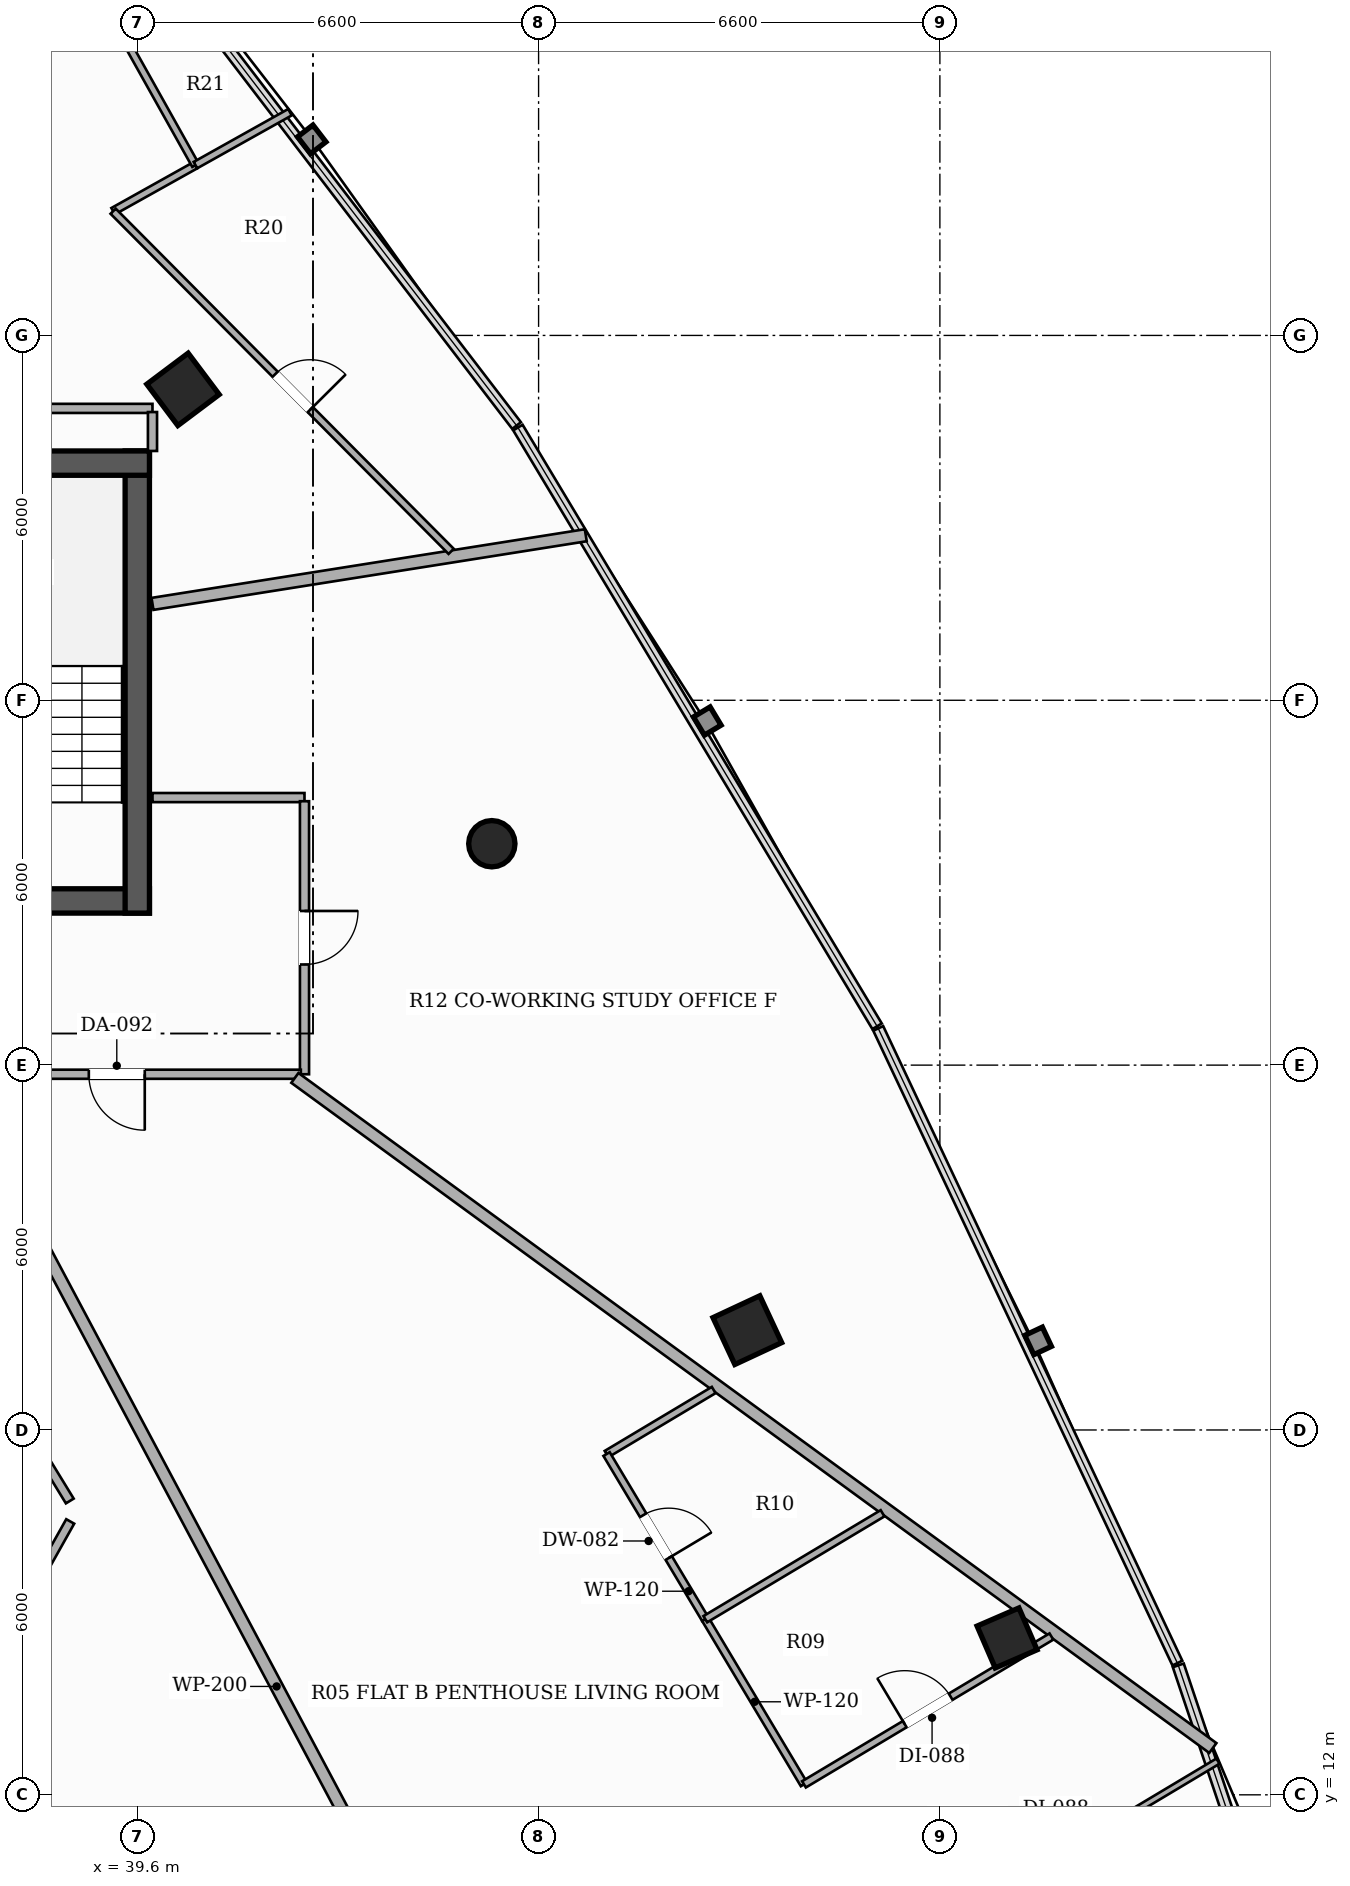
"""IFC4 building model, lengths in metres.
Left out: names, types, materials, properties, quantities, classifications, styles, units other than length and angle.
Written with IfcOpenShell. Run it as: python <this file> out.ifc"""

import sys

from ifc_helpers import new_model, si_unit, direction, frame, frame_2d, origin, origin_2d, place, context, subcontext, project, spatial, rectangle, hollow_rectangle, hollow_circle, extrude, element, fill, save


model = new_model("IFC4")
c1 = context("Model", 3, precision=1e-05, world=origin(), true_north=direction((0.0, 1.0)))
c2 = subcontext(c1, "Body", "Model", "MODEL_VIEW")
j1 = project(units=[si_unit("LENGTHUNIT", "METRE"), si_unit("PLANEANGLEUNIT", "RADIAN")], contexts=[c1])
p1 = place(None, origin())
s1 = spatial("IfcSite", under=j1, at=p1, CompositionType="ELEMENT")
p2 = place(p1, origin())
s2 = spatial("IfcBuilding", under=s1, at=p2, CompositionType="ELEMENT")
p3 = place(p2, frame((0.0, 0.0, 119.9)))
s3 = spatial("IfcBuildingStorey", under=s2, at=p3, CompositionType="ELEMENT", Elevation=119.9)
p4 = place(p3, frame((26.2, 26.7, 0.0), z_axis=(0.0, 0.0, 1.0), x_axis=(1.0, 0.0, 0.0)))
e1 = element("IfcWall", 1, at=p4, inside=s3, PredefinedType="SHEAR", context=c2, shape_type="SweptSolid", body=[
    extrude(rectangle(XDim=13.6, YDim=0.4, at=frame_2d((6.8, 0.0))), origin(), (0.0, 0.0, 1.0), 3.3),
])
p5 = place(p4, frame((4.35, 0.0, 0.0)))
e2 = element("IfcOpeningElement", 2, at=p5, cuts=e1, PredefinedType="OPENING", context=c2, shape_type="SweptSolid", body=[
    extrude(rectangle(XDim=1.05, YDim=2.15, at=frame_2d((0.525, 1.075))), frame((0.0, 0.21, 0.0), z_axis=(0.0, -1.0, 0.0), x_axis=(1.0, 0.0, 0.0)), (0.0, 0.0, 1.0), 0.42),
])
p6 = place(p4, frame((8.3, 0.0, 0.0)))
e3 = element("IfcOpeningElement", 3, at=p6, cuts=e1, PredefinedType="OPENING", context=c2, shape_type="SweptSolid", body=[
    extrude(rectangle(XDim=1.05, YDim=2.15, at=frame_2d((0.525, 1.075))), frame((0.0, 0.21, 0.0), z_axis=(0.0, -1.0, 0.0), x_axis=(1.0, 0.0, 0.0)), (0.0, 0.0, 1.0), 0.42),
])
p7 = place(p3, frame((39.6, 26.5, 0.0), z_axis=(0.0, 0.0, 1.0), x_axis=(0.0, 1.0, 0.0)))
e4 = element("IfcWall", 4, at=p7, inside=s3, PredefinedType="SHEAR", context=c2, shape_type="SweptSolid", body=[
    extrude(rectangle(XDim=7.6, YDim=0.4, at=frame_2d((3.8, 0.0))), origin(), (0.0, 0.0, 1.0), 3.3),
])
p8 = place(p3, frame((36.12, 33.9, 0.0), z_axis=(0.0, 0.0, 1.0), x_axis=(1.0, 0.0, 0.0)))
e5 = element("IfcWall", 5, at=p8, inside=s3, PredefinedType="SHEAR", context=c2, shape_type="SweptSolid", body=[
    extrude(rectangle(XDim=3.68, YDim=0.4, at=frame_2d((1.84, 0.0))), origin(), (0.0, 0.0, 1.0), 3.3),
])
p9 = place(p3, frame((49.633, 19.642, 0.0), z_axis=(0.0, 0.0, 1.0), x_axis=(-0.422618261741, 0.906307787037, 0.0)))
e6 = element("IfcColumn", 6, at=p9, inside=s3, PredefinedType="COLUMN", context=c2, shape_type="SweptSolid", body=[
    extrude(hollow_rectangle(XDim=0.85, YDim=0.85, WallThickness=0.028, at=origin_2d()), origin(), (0.0, 0.0, 1.0), 3.3),
])
p10 = place(p3, frame((45.431, 27.641, 0.0), z_axis=(0.0, 0.0, 1.0), x_axis=(1.0, 0.0, 0.0)))
e7 = element("IfcColumn", 7, at=p10, inside=s3, PredefinedType="COLUMN", context=c2, shape_type="SweptSolid", body=[
    extrude(hollow_circle(Radius=0.381, WallThickness=0.022, at=origin_2d()), origin(), (0.0, 0.0, 1.0), 3.3),
])
p11 = place(p3, frame((40.352, 35.113, 0.0), z_axis=(0.0, 0.0, 1.0), x_axis=(-0.600420225326, 0.799684658487, 0.0)))
e8 = element("IfcColumn", 8, at=p11, inside=s3, PredefinedType="COLUMN", context=c2, shape_type="SweptSolid", body=[
    extrude(hollow_rectangle(XDim=0.85, YDim=0.85, WallThickness=0.028, at=origin_2d()), origin(), (0.0, 0.0, 1.0), 3.3),
])
for number, where, z_axis, x_axis in (
    (9, (53.905, 14.58, 0.0), (0.0, 0.0, 1.0), (-0.397, 0.918, 0.0)),
    (10, (37.95, 41.178, 0.0), (0.0, 0.0, 1.0), (-0.624, 0.782, 0.0)),
):
    element("IfcColumn", number, at=place(p3, frame(where, z_axis=z_axis, x_axis=x_axis)), inside=s3, PredefinedType="COLUMN", context=c2, shape_type="SweptSolid", body=[
        extrude(hollow_rectangle(XDim=0.75, YDim=0.75, WallThickness=0.025, at=origin_2d()), origin(), (0.0, 0.0, 1.0), 3.3),
    ])
p12 = place(p3, frame((39.85, 28.4, 0.0), z_axis=(0.0, 0.0, 1.0), x_axis=(1.0, 0.0, 0.0)))
e11 = element("IfcWall", 11, at=p12, inside=s3, PredefinedType="PARTITIONING", context=c2, shape_type="SweptSolid", body=[
    extrude(rectangle(XDim=2.5, YDim=0.15, at=frame_2d((1.25, 0.0))), origin(), (0.0, 0.0, 1.0), 2.721),
])
p13 = place(p3, frame((42.35, 28.34, 0.0), z_axis=(0.0, 0.0, 1.0), x_axis=(0.0, -1.0, 0.0)))
e12 = element("IfcWall", 12, at=p13, inside=s3, PredefinedType="PARTITIONING", context=c2, shape_type="SweptSolid", body=[
    extrude(rectangle(XDim=4.49, YDim=0.15, at=frame_2d((2.245, 0.0))), origin(), (0.0, 0.0, 1.0), 2.721),
])
p14 = place(p13, frame((1.805, 0.0, 0.0)))
e13 = element("IfcOpeningElement", 13, at=p14, cuts=e12, PredefinedType="OPENING", context=c2, shape_type="SweptSolid", body=[
    extrude(rectangle(XDim=0.88, YDim=2.1, at=frame_2d((0.44, 1.05))), frame((0.0, 0.085, 0.0), z_axis=(0.0, -1.0, 0.0), x_axis=(1.0, 0.0, 0.0)), (0.0, 0.0, 1.0), 0.17),
])
p15 = place(p3, frame((42.29, 23.85, 0.0), z_axis=(0.0, 0.0, 1.0), x_axis=(-1.0, 0.0, 0.0)))
e14 = element("IfcWall", 14, at=p15, inside=s3, PredefinedType="PARTITIONING", context=c2, shape_type="SweptSolid", body=[
    extrude(rectangle(XDim=8.088, YDim=0.15, at=frame_2d((4.044, 0.0))), origin(), (0.0, 0.0, 1.0), 2.492),
])
p16 = place(p15, frame((2.567, 0.0, 0.0)))
e15 = element("IfcOpeningElement", 15, at=p16, cuts=e14, PredefinedType="OPENING", context=c2, shape_type="SweptSolid", body=[
    extrude(rectangle(XDim=0.92, YDim=2.15, at=frame_2d((0.46, 1.075))), frame((0.0, 0.085, 0.0), z_axis=(0.0, -1.0, 0.0), x_axis=(1.0, 0.0, 0.0)), (0.0, 0.0, 1.0), 0.17),
])
p17 = place(p15, frame((6.296, 0.0, 0.0)))
e16 = element("IfcOpeningElement", 16, at=p17, cuts=e14, PredefinedType="OPENING", context=c2, shape_type="SweptSolid", body=[
    extrude(rectangle(XDim=0.92, YDim=2.15, at=frame_2d((0.46, 1.075))), frame((0.0, 0.085, 0.0), z_axis=(0.0, -1.0, 0.0), x_axis=(1.0, 0.0, 0.0)), (0.0, 0.0, 1.0), 0.17),
])
p18 = place(p3, frame((37.91, 34.8, 0.0), z_axis=(0.0, 0.0, 1.0), x_axis=(1.0, 0.0, 0.0)))
e17 = element("IfcWall", 17, at=p18, inside=s3, PredefinedType="PARTITIONING", context=c2, shape_type="SweptSolid", body=[
    extrude(rectangle(XDim=1.94, YDim=0.15, at=frame_2d((0.97, 0.0))), origin(), (0.0, 0.0, 1.0), 2.721),
])
p19 = place(p3, frame((39.85, 34.74, 0.0), z_axis=(0.0, 0.0, 1.0), x_axis=(0.0, -1.0, 0.0)))
e18 = element("IfcWall", 18, at=p19, inside=s3, PredefinedType="PARTITIONING", context=c2, shape_type="SweptSolid", body=[
    extrude(rectangle(XDim=0.64, YDim=0.15, at=frame_2d((0.32, 0.0))), origin(), (0.0, 0.0, 1.0), 2.721),
])
p20 = place(p3, frame((34.233, 23.79, 0.0), z_axis=(0.0, 0.0, 1.0), x_axis=(0.521893040745, -0.853010934292, 0.0)))
e19 = element("IfcWall", 19, at=p20, inside=s3, PredefinedType="PARTITIONING", context=c2, shape_type="SweptSolid", body=[
    extrude(rectangle(XDim=8.157, YDim=0.15, at=frame_2d((4.079, 0.0))), origin(), (0.0, 0.0, 1.0), 2.721),
])
p21 = place(p3, frame((38.497, 16.496, 0.0), z_axis=(0.0, 0.0, 1.0), x_axis=(-0.489281087794, -0.872126147485, 0.0)))
e20 = element("IfcWall", 20, at=p21, inside=s3, PredefinedType="PARTITIONING", context=c2, shape_type="SweptSolid", body=[
    extrude(rectangle(XDim=1.053, YDim=0.15, at=frame_2d((0.526, 0.0))), origin(), (0.0, 0.0, 1.0), 3.06),
])
p22 = place(p3, frame((47.214, 3.775, 0.0), z_axis=(0.0, 0.0, 1.0), x_axis=(-0.469567249912, 0.88289670846, 0.0)))
e21 = element("IfcWall", 21, at=p22, inside=s3, PredefinedType="PARTITIONING", context=c2, shape_type="SweptSolid", body=[
    extrude(rectangle(XDim=22.67, YDim=0.2, at=frame_2d((11.335, 0.0))), origin(), (0.0, 0.0, 1.0), 2.413),
])
p23 = place(p3, frame((42.192, 23.79, 0.0), z_axis=(0.0, 0.0, 1.0), x_axis=(0.807710254014, -0.589579634621, 0.0)))
e22 = element("IfcWall", 22, at=p23, inside=s3, PredefinedType="PARTITIONING", context=c2, shape_type="SweptSolid", body=[
    extrude(rectangle(XDim=18.691, YDim=0.2, at=frame_2d((9.346, 0.0))), origin(), (0.0, 0.0, 1.0), 2.413),
])
p24 = place(p3, frame((46.976, 32.714, 0.0), z_axis=(0.0, 0.0, 1.0), x_axis=(-0.987677489662, -0.156502959767, 0.0)))
e23 = element("IfcWall", 23, at=p24, inside=s3, PredefinedType="PARTITIONING", context=c2, shape_type="SweptSolid", body=[
    extrude(rectangle(XDim=7.215, YDim=0.2, at=frame_2d((3.607, 0.0))), origin(), (0.0, 0.0, 1.0), 2.413),
])
p25 = place(p3, frame((49.08, 18.657, 0.0), z_axis=(0.0, 0.0, 1.0), x_axis=(-0.858394155401, -0.51299071529, 0.0)))
e24 = element("IfcWall", 24, at=p25, inside=s3, PredefinedType="PARTITIONING", context=c2, shape_type="SweptSolid", body=[
    extrude(rectangle(XDim=2.053, YDim=0.12, at=frame_2d((1.026, 0.0))), origin(), (0.0, 0.0, 1.0), 2.721),
])
p26 = place(p3, frame((47.318, 17.604, 0.0), z_axis=(0.0, 0.0, 1.0), x_axis=(0.51313361254, -0.858308741469, 0.0)))
e25 = element("IfcWall", 25, at=p26, inside=s3, PredefinedType="PARTITIONING", context=c2, shape_type="SweptSolid", body=[
    extrude(rectangle(XDim=3.165, YDim=0.12, at=frame_2d((1.582, 0.0))), origin(), (0.0, 0.0, 1.0), 2.492),
])
p27 = place(p26, frame((1.172, 0.0, 0.0)))
e26 = element("IfcOpeningElement", 26, at=p27, cuts=e25, PredefinedType="OPENING", context=c2, shape_type="SweptSolid", body=[
    extrude(rectangle(XDim=0.82, YDim=2.1, at=frame_2d((0.41, 1.05))), frame((0.0, 0.07, 0.0), z_axis=(0.0, -1.0, 0.0), x_axis=(1.0, 0.0, 0.0)), (0.0, 0.0, 1.0), 0.14),
])
p28 = place(p3, frame((48.942, 14.888, 0.0), z_axis=(0.0, 0.0, 1.0), x_axis=(0.512997049548, -0.858390369911, 0.0)))
e27 = element("IfcWall", 27, at=p28, inside=s3, PredefinedType="PARTITIONING", context=c2, shape_type="SweptSolid", body=[
    extrude(rectangle(XDim=3.164, YDim=0.12, at=frame_2d((1.582, 0.0))), origin(), (0.0, 0.0, 1.0), 2.492),
])
p29 = place(p3, frame((50.565, 12.172, 0.0), z_axis=(0.0, 0.0, 1.0), x_axis=(0.858473034369, 0.512858703018, 0.0)))
e28 = element("IfcWall", 28, at=p29, inside=s3, PredefinedType="PARTITIONING", context=c2, shape_type="SweptSolid", body=[
    extrude(rectangle(XDim=4.74, YDim=0.12, at=frame_2d((2.37, 0.0))), origin(), (0.0, 0.0, 1.0), 2.413),
])
p30 = place(p29, frame((1.93, 0.0, 0.0)))
e29 = element("IfcOpeningElement", 29, at=p30, cuts=e28, PredefinedType="OPENING", context=c2, shape_type="SweptSolid", body=[
    extrude(rectangle(XDim=0.88, YDim=2.1, at=frame_2d((0.44, 1.05))), frame((0.0, 0.07, 0.0), z_axis=(0.0, -1.0, 0.0), x_axis=(1.0, 0.0, 0.0)), (0.0, 0.0, 1.0), 0.14),
])
p31 = place(p3, frame((57.373, 12.554, 0.0), z_axis=(0.0, 0.0, 1.0), x_axis=(-0.858379637305, -0.513015007831, 0.0)))
e30 = element("IfcWall", 30, at=p31, inside=s3, PredefinedType="PARTITIONING", context=c2, shape_type="SweptSolid", body=[
    extrude(rectangle(XDim=6.041, YDim=0.1, at=frame_2d((3.02, 0.0))), origin(), (0.0, 0.0, 1.0), 2.619),
])
p32 = place(p31, frame((2.58, 0.0, 0.0)))
e31 = element("IfcOpeningElement", 31, at=p32, cuts=e30, PredefinedType="OPENING", context=c2, shape_type="SweptSolid", body=[
    extrude(rectangle(XDim=0.88, YDim=2.1, at=frame_2d((0.44, 1.05))), frame((0.0, 0.06, 0.0), z_axis=(0.0, -1.0, 0.0), x_axis=(1.0, 0.0, 0.0)), (0.0, 0.0, 1.0), 0.12),
])
p33 = place(p3, frame((51.857, 16.63, 0.0), z_axis=(0.0, 0.0, 1.0), x_axis=(-0.858411372428, -0.512961904713, 0.0)))
e32 = element("IfcWall", 32, at=p33, inside=s3, PredefinedType="PARTITIONING", context=c2, shape_type="SweptSolid", body=[
    extrude(rectangle(XDim=3.396, YDim=0.12, at=frame_2d((1.698, 0.0))), origin(), (0.0, 0.0, 1.0), 2.413),
])
p34 = place(p3, frame((40.557, 38.8, 0.0), z_axis=(0.0, 0.0, 1.0), x_axis=(-0.872825188639, -0.488032980521, 0.0)))
e33 = element("IfcWall", 33, at=p34, inside=s3, PredefinedType="PARTITIONING", context=c2, shape_type="SweptSolid", body=[
    extrude(rectangle(XDim=1.551, YDim=0.12, at=frame_2d((0.776, 0.0))), origin(), (0.0, 0.0, 1.0), 2.413),
])
p35 = place(p3, frame((39.203, 38.043, 0.0), z_axis=(0.0, 0.0, 1.0), x_axis=(0.704889894519, -0.709316739267, 0.0)))
e34 = element("IfcWall", 34, at=p35, inside=s3, PredefinedType="PARTITIONING", context=c2, shape_type="SweptSolid", body=[
    extrude(rectangle(XDim=7.886, YDim=0.12, at=frame_2d((3.943, 0.0))), origin(), (0.0, 0.0, 1.0), 2.413),
])
p36 = place(p35, frame((3.78, 0.0, 0.0)))
e35 = element("IfcOpeningElement", 35, at=p36, cuts=e34, PredefinedType="OPENING", context=c2, shape_type="SweptSolid", body=[
    extrude(rectangle(XDim=0.82, YDim=2.1, at=frame_2d((0.41, 1.05))), frame((0.0, 0.07, 0.0), z_axis=(0.0, -1.0, 0.0), x_axis=(1.0, 0.0, 0.0)), (0.0, 0.0, 1.0), 0.14),
])
p37 = place(p3, frame((35.205, 48.357, 0.0), z_axis=(0.0, 0.0, 1.0), x_axis=(0.488599975334, -0.872507916356, 0.0)))
e36 = element("IfcWall", 36, at=p37, inside=s3, PredefinedType="PARTITIONING", context=c2, shape_type="SweptSolid", body=[
    extrude(rectangle(XDim=10.953, YDim=0.12, at=frame_2d((5.477, 0.0))), origin(), (0.0, 0.0, 1.0), 2.619),
])
p38 = place(p37, frame((5.037, 0.0, 0.0)))
e37 = element("IfcOpeningElement", 37, at=p38, cuts=e36, PredefinedType="OPENING", context=c2, shape_type="SweptSolid", body=[
    extrude(rectangle(XDim=0.88, YDim=2.1, at=frame_2d((0.44, 1.05))), frame((0.0, 0.07, 0.0), z_axis=(0.0, -1.0, 0.0), x_axis=(1.0, 0.0, 0.0)), (0.0, 0.0, 1.0), 0.14),
])
p39 = place(p3, frame((40.557, 38.801, 0.0), z_axis=(0.0, 0.0, 1.0), x_axis=(0.872620527381, 0.488398828002, 0.0)))
e38 = element("IfcWall", 38, at=p39, inside=s3, PredefinedType="PARTITIONING", context=c2, shape_type="SweptSolid", body=[
    extrude(rectangle(XDim=1.781, YDim=0.12, at=frame_2d((0.891, 0.0))), origin(), (0.0, 0.0, 1.0), 3.06),
])
p40 = place(p16, origin())
e39 = element("IfcDoor", 39, at=p40, inside=s3, OperationType="SINGLE_SWING_LEFT", PredefinedType="DOOR", context=c2, shape_type="SweptSolid", body=[
    extrude(rectangle(XDim=0.92, YDim=2.15, at=frame_2d((0.46, 1.075))), frame((0.0, 0.025, 0.0), z_axis=(0.0, -1.0, 0.0), x_axis=(1.0, 0.0, 0.0)), (0.0, 0.0, 1.0), 0.05),
])
fill(e15, e39)
p41 = place(p27, origin())
e40 = element("IfcDoor", 40, at=p41, inside=s3, OperationType="SINGLE_SWING_RIGHT", PredefinedType="DOOR", context=c2, shape_type="SweptSolid", body=[
    extrude(rectangle(XDim=0.82, YDim=2.1, at=frame_2d((0.41, 1.05))), frame((0.0, 0.025, 0.0), z_axis=(0.0, -1.0, 0.0), x_axis=(1.0, 0.0, 0.0)), (0.0, 0.0, 1.0), 0.05),
])
fill(e26, e40)
p42 = place(p30, origin())
e41 = element("IfcDoor", 41, at=p42, inside=s3, OperationType="SINGLE_SWING_LEFT", PredefinedType="DOOR", context=c2, shape_type="SweptSolid", body=[
    extrude(rectangle(XDim=0.88, YDim=2.1, at=frame_2d((0.44, 1.05))), frame((0.0, 0.025, 0.0), z_axis=(0.0, -1.0, 0.0), x_axis=(1.0, 0.0, 0.0)), (0.0, 0.0, 1.0), 0.05),
])
fill(e29, e41)
p43 = place(p36, origin())
e42 = element("IfcDoor", 42, at=p43, inside=s3, OperationType="SINGLE_SWING_RIGHT", PredefinedType="DOOR", context=c2, shape_type="SweptSolid", body=[
    extrude(rectangle(XDim=0.82, YDim=2.1, at=frame_2d((0.41, 1.05))), frame((0.0, 0.025, 0.0), z_axis=(0.0, -1.0, 0.0), x_axis=(1.0, 0.0, 0.0)), (0.0, 0.0, 1.0), 0.05),
])
fill(e35, e42)
p44 = place(p14, origin())
e43 = element("IfcDoor", 43, at=p44, inside=s3, OperationType="SINGLE_SWING_LEFT", PredefinedType="DOOR", context=c2, shape_type="SweptSolid", body=[
    extrude(rectangle(XDim=0.88, YDim=2.1, at=frame_2d((0.44, 1.05))), frame((0.0, 0.025, 0.0), z_axis=(0.0, -1.0, 0.0), x_axis=(1.0, 0.0, 0.0)), (0.0, 0.0, 1.0), 0.05),
])
fill(e13, e43)
save(model, sys.argv[1])
